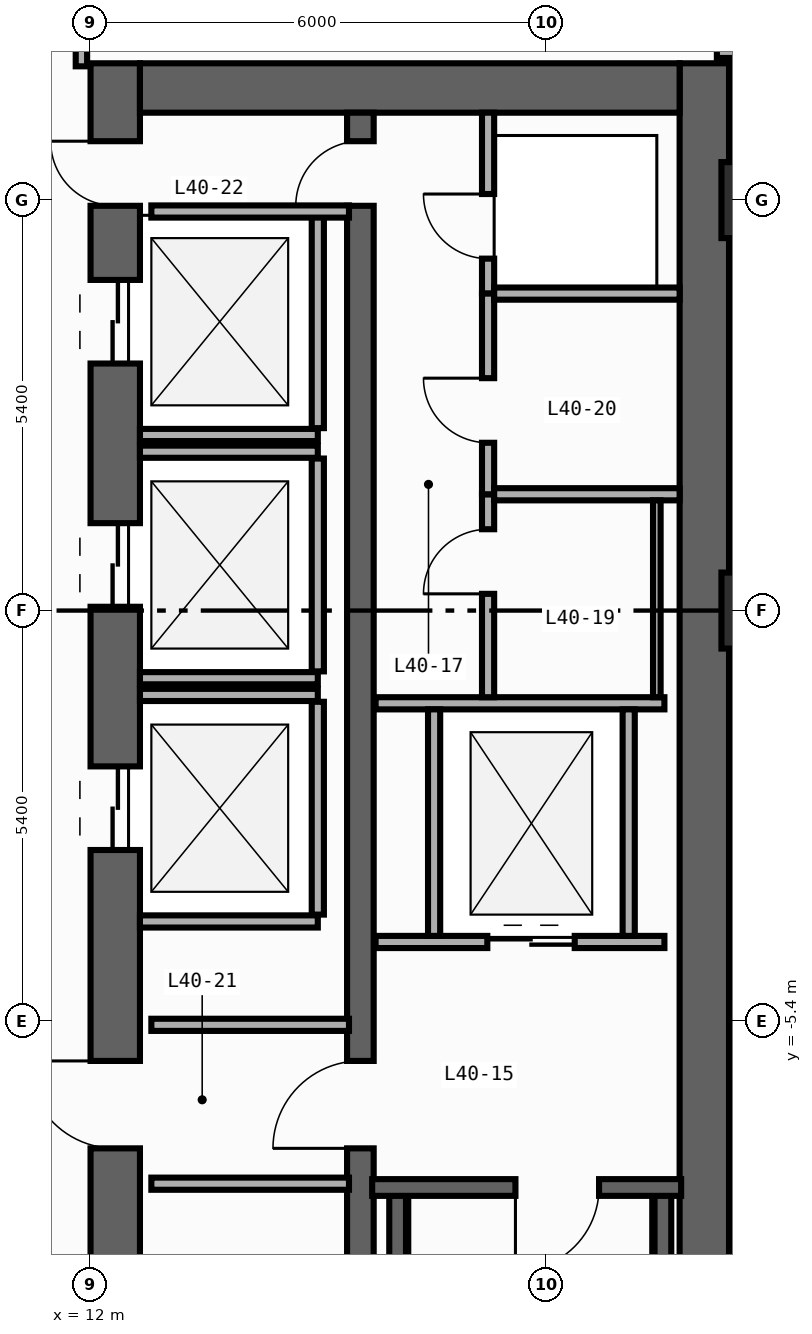
"""IFC4 building model, lengths in metres.
Left out: names, types, materials, properties, quantities, classifications, styles, units other than length and angle.
Written with IfcOpenShell. Run it as: python <this file> out.ifc"""

import sys

from ifc_helpers import new_model, si_unit, direction, frame, frame_2d, origin, origin_2d, place, context, subcontext, project, spatial, rectangle, extrude, element, fill, save


model = new_model("IFC4")
c1 = context("Model", 3, precision=1e-05, world=origin(), true_north=direction((0.0, 1.0)))
c2 = subcontext(c1, "Body", "Model", "MODEL_VIEW")
j1 = project(units=[si_unit("LENGTHUNIT", "METRE"), si_unit("PLANEANGLEUNIT", "RADIAN")], contexts=[c1])
p1 = place(None, origin())
s1 = spatial("IfcSite", under=j1, at=p1, CompositionType="ELEMENT")
p2 = place(p1, origin())
s2 = spatial("IfcBuilding", under=s1, at=p2, CompositionType="ELEMENT")
p3 = place(p2, frame((0.0, 0.0, 176.4)))
s3 = spatial("IfcBuildingStorey", under=s2, at=p3, CompositionType="ELEMENT", Elevation=176.4)
p4 = place(p3, frame((12.325, -19.8, 0.0), z_axis=(0.0, 0.0, 1.0), x_axis=(0.0, 1.0, 0.0)))
e1 = element("IfcWall", 1, at=p4, inside=s3, PredefinedType="SHEAR", context=c2, shape_type="SweptSolid", body=[
    extrude(rectangle(XDim=27.0, YDim=0.65, at=frame_2d((13.5, 0.0))), origin(), (0.0, 0.0, 1.0), 3.54),
])
p5 = place(p4, frame((23.05, 0.0, 0.0)))
e2 = element("IfcOpeningElement", 2, at=p5, cuts=e1, PredefinedType="OPENING", context=c2, shape_type="SweptSolid", body=[
    extrude(rectangle(XDim=1.1, YDim=2.2, at=frame_2d((0.55, 1.1))), frame((0.0, 0.335, 0.0), z_axis=(0.0, -1.0, 0.0), x_axis=(1.0, 0.0, 0.0)), (0.0, 0.0, 1.0), 0.67),
])
p6 = place(p4, frame((19.85, 0.0, 0.0)))
e3 = element("IfcOpeningElement", 3, at=p6, cuts=e1, PredefinedType="OPENING", context=c2, shape_type="SweptSolid", body=[
    extrude(rectangle(XDim=1.1, YDim=2.2, at=frame_2d((0.55, 1.1))), frame((0.0, 0.335, 0.0), z_axis=(0.0, -1.0, 0.0), x_axis=(1.0, 0.0, 0.0)), (0.0, 0.0, 1.0), 0.67),
])
p7 = place(p4, frame((16.65, 0.0, 0.0)))
e4 = element("IfcOpeningElement", 4, at=p7, cuts=e1, PredefinedType="OPENING", context=c2, shape_type="SweptSolid", body=[
    extrude(rectangle(XDim=1.1, YDim=2.2, at=frame_2d((0.55, 1.1))), frame((0.0, 0.335, 0.0), z_axis=(0.0, -1.0, 0.0), x_axis=(1.0, 0.0, 0.0)), (0.0, 0.0, 1.0), 0.67),
])
p8 = place(p4, frame((7.175, 0.0, 0.0)))
e5 = element("IfcOpeningElement", 5, at=p8, cuts=e1, PredefinedType="OPENING", context=c2, shape_type="SweptSolid", body=[
    extrude(rectangle(XDim=0.85, YDim=2.1, at=frame_2d((0.425, 1.05))), frame((0.0, 0.335, 0.0), z_axis=(0.0, -1.0, 0.0), x_axis=(1.0, 0.0, 0.0)), (0.0, 0.0, 1.0), 0.67),
])
p9 = place(p4, frame((10.375, 0.0, 0.0)))
e6 = element("IfcOpeningElement", 6, at=p9, cuts=e1, PredefinedType="OPENING", context=c2, shape_type="SweptSolid", body=[
    extrude(rectangle(XDim=0.85, YDim=2.1, at=frame_2d((0.425, 1.05))), frame((0.0, 0.335, 0.0), z_axis=(0.0, -1.0, 0.0), x_axis=(1.0, 0.0, 0.0)), (0.0, 0.0, 1.0), 0.67),
])
p10 = place(p4, frame((12.725, 0.0, 0.0)))
e7 = element("IfcOpeningElement", 7, at=p10, cuts=e1, PredefinedType="OPENING", context=c2, shape_type="SweptSolid", body=[
    extrude(rectangle(XDim=1.15, YDim=2.2, at=frame_2d((0.575, 1.1))), frame((0.0, 0.335, 0.0), z_axis=(0.0, -1.0, 0.0), x_axis=(1.0, 0.0, 0.0)), (0.0, 0.0, 1.0), 0.67),
])
p11 = place(p4, frame((25.125, 0.0, 0.0)))
e8 = element("IfcOpeningElement", 8, at=p11, cuts=e1, PredefinedType="OPENING", context=c2, shape_type="SweptSolid", body=[
    extrude(rectangle(XDim=0.85, YDim=2.1, at=frame_2d((0.425, 1.05))), frame((0.0, 0.335, 0.0), z_axis=(0.0, -1.0, 0.0), x_axis=(1.0, 0.0, 0.0)), (0.0, 0.0, 1.0), 0.67),
])
p12 = place(p3, frame((20.075, -19.8, 0.0), z_axis=(0.0, 0.0, 1.0), x_axis=(0.0, 1.0, 0.0)))
e9 = element("IfcWall", 9, at=p12, inside=s3, PredefinedType="SHEAR", context=c2, shape_type="SweptSolid", body=[
    extrude(rectangle(XDim=27.0, YDim=0.65, at=frame_2d((13.5, 0.0))), origin(), (0.0, 0.0, 1.0), 3.54),
])
p13 = place(p3, frame((12.65, 6.875, 0.0), z_axis=(0.0, 0.0, 1.0), x_axis=(1.0, 0.0, 0.0)))
e10 = element("IfcWall", 10, at=p13, inside=s3, PredefinedType="SHEAR", context=c2, shape_type="SweptSolid", body=[
    extrude(rectangle(XDim=7.1, YDim=0.65, at=frame_2d((3.55, 0.0))), origin(), (0.0, 0.0, 1.0), 3.54),
])
p14 = place(p3, frame((15.55, -19.15, 0.0), z_axis=(0.0, 0.0, 1.0), x_axis=(0.0, 1.0, 0.0)))
e11 = element("IfcWall", 11, at=p14, inside=s3, PredefinedType="SHEAR", context=c2, shape_type="SweptSolid", body=[
    extrude(rectangle(XDim=25.7, YDim=0.35, at=frame_2d((12.85, 0.0))), origin(), (0.0, 0.0, 1.0), 3.54),
])
p15 = place(p14, frame((12.075, 0.0, 0.0)))
e12 = element("IfcOpeningElement", 12, at=p15, cuts=e11, PredefinedType="OPENING", context=c2, shape_type="SweptSolid", body=[
    extrude(rectangle(XDim=1.15, YDim=2.2, at=frame_2d((0.575, 1.1))), frame((0.0, 0.185, 0.0), z_axis=(0.0, -1.0, 0.0), x_axis=(1.0, 0.0, 0.0)), (0.0, 0.0, 1.0), 0.37),
])
p16 = place(p14, frame((24.475, 0.0, 0.0)))
e13 = element("IfcOpeningElement", 13, at=p16, cuts=e11, PredefinedType="OPENING", context=c2, shape_type="SweptSolid", body=[
    extrude(rectangle(XDim=0.85, YDim=2.1, at=frame_2d((0.425, 1.05))), frame((0.0, 0.185, 0.0), z_axis=(0.0, -1.0, 0.0), x_axis=(1.0, 0.0, 0.0)), (0.0, 0.0, 1.0), 0.37),
])
for number, where, z_axis, x_axis in (
    (14, (16.04, -19.01, 0.0), (0.0, 0.0, 1.0), (0.0, 1.0, 0.0)),
    (15, (19.53, -19.01, 0.0), (0.0, 0.0, 1.0), (0.0, 1.0, 0.0)),
):
    element("IfcWall", number, at=place(p3, frame(where, z_axis=z_axis, x_axis=x_axis)), inside=s3, PredefinedType="SHEAR", context=c2, shape_type="SweptSolid", body=[
        extrude(rectangle(XDim=11.42, YDim=0.22, at=frame_2d((5.71, 0.0))), origin(), (0.0, 0.0, 1.0), 3.54),
    ])
p17 = place(p3, frame((19.77, -7.59, 0.0), z_axis=(0.0, 0.0, 1.0), x_axis=(-1.0, 0.0, 0.0)))
e16 = element("IfcWall", 16, at=p17, inside=s3, PredefinedType="SHEAR", context=c2, shape_type="SweptSolid", body=[
    extrude(rectangle(XDim=4.065, YDim=0.22, at=frame_2d((2.032, 0.0))), origin(), (0.0, 0.0, 1.0), 3.54),
])
p18 = place(p17, frame((1.08, 0.0, 0.0)))
e17 = element("IfcOpeningElement", 17, at=p18, cuts=e16, PredefinedType="OPENING", context=c2, shape_type="SweptSolid", body=[
    extrude(rectangle(XDim=1.1, YDim=2.2, at=frame_2d((0.55, 1.1))), frame((0.0, 0.12, 0.0), z_axis=(0.0, -1.0, 0.0), x_axis=(1.0, 0.0, 0.0)), (0.0, 0.0, 1.0), 0.24),
])
for number, where, z_axis, x_axis in (
    (18, (20.8, 0.0, 0.0), (0.0, 0.0, 1.0), (1.0, 0.0, 0.0)),
    (19, (20.8, 5.4, 0.0), (0.0, 0.0, 1.0), (1.0, 0.0, 0.0)),
):
    element("IfcColumn", number, at=place(p3, frame(where, z_axis=z_axis, x_axis=x_axis)), inside=s3, PredefinedType="COLUMN", context=c2, shape_type="SweptSolid", body=[
        extrude(rectangle(XDim=1.0, YDim=1.0, at=origin_2d()), origin(), (0.0, 0.0, 1.0), 3.8),
    ])
p19 = place(p3, frame((12.65, 2.31, 0.0), z_axis=(0.0, 0.0, 1.0), x_axis=(1.0, 0.0, 0.0)))
e20 = element("IfcWall", 20, at=p19, inside=s3, PredefinedType="STANDARD", context=c2, shape_type="SweptSolid", body=[
    extrude(rectangle(XDim=2.34, YDim=0.16, at=frame_2d((1.17, 0.0))), origin(), (0.0, 0.0, 1.0), 3.54),
])
p20 = place(p3, frame((14.99, 2.4, 0.0), z_axis=(0.0, 0.0, 1.0), x_axis=(0.0, 1.0, 0.0)))
e21 = element("IfcWall", 21, at=p20, inside=s3, PredefinedType="STANDARD", context=c2, shape_type="SweptSolid", body=[
    extrude(rectangle(XDim=2.8, YDim=0.16, at=frame_2d((1.4, 0.0))), origin(), (0.0, 0.0, 1.0), 3.54),
])
for number, where, z_axis, x_axis in (
    (22, (12.65, -0.89, 0.0), (0.0, 0.0, 1.0), (1.0, 0.0, 0.0)),
    (23, (12.65, 2.09, 0.0), (0.0, 0.0, 1.0), (1.0, 0.0, 0.0)),
):
    element("IfcWall", number, at=place(p3, frame(where, z_axis=z_axis, x_axis=x_axis)), inside=s3, PredefinedType="STANDARD", context=c2, shape_type="SweptSolid", body=[
        extrude(rectangle(XDim=2.34, YDim=0.16, at=frame_2d((1.17, 0.0))), origin(), (0.0, 0.0, 1.0), 3.54),
    ])
p21 = place(p3, frame((14.99, -0.8, 0.0), z_axis=(0.0, 0.0, 1.0), x_axis=(0.0, 1.0, 0.0)))
e24 = element("IfcWall", 24, at=p21, inside=s3, PredefinedType="STANDARD", context=c2, shape_type="SweptSolid", body=[
    extrude(rectangle(XDim=2.8, YDim=0.16, at=frame_2d((1.4, 0.0))), origin(), (0.0, 0.0, 1.0), 3.54),
])
for number, where, z_axis, x_axis in (
    (25, (12.65, -4.09, 0.0), (0.0, 0.0, 1.0), (1.0, 0.0, 0.0)),
    (26, (12.65, -1.11, 0.0), (0.0, 0.0, 1.0), (1.0, 0.0, 0.0)),
):
    element("IfcWall", number, at=place(p3, frame(where, z_axis=z_axis, x_axis=x_axis)), inside=s3, PredefinedType="STANDARD", context=c2, shape_type="SweptSolid", body=[
        extrude(rectangle(XDim=2.34, YDim=0.16, at=frame_2d((1.17, 0.0))), origin(), (0.0, 0.0, 1.0), 3.54),
    ])
p22 = place(p3, frame((14.99, -4.0, 0.0), z_axis=(0.0, 0.0, 1.0), x_axis=(0.0, 1.0, 0.0)))
e27 = element("IfcWall", 27, at=p22, inside=s3, PredefinedType="STANDARD", context=c2, shape_type="SweptSolid", body=[
    extrude(rectangle(XDim=2.8, YDim=0.16, at=frame_2d((1.4, 0.0))), origin(), (0.0, 0.0, 1.0), 3.54),
])
p23 = place(p3, frame((15.75, -4.36, 0.0), z_axis=(0.0, 0.0, 1.0), x_axis=(1.0, 0.0, 0.0)))
e28 = element("IfcWall", 28, at=p23, inside=s3, PredefinedType="STANDARD", context=c2, shape_type="SweptSolid", body=[
    extrude(rectangle(XDim=3.8, YDim=0.16, at=frame_2d((1.9, 0.0))), origin(), (0.0, 0.0, 1.0), 3.54),
])
p24 = place(p23, frame((1.47, 0.0, 0.0)))
e29 = element("IfcOpeningElement", 29, at=p24, cuts=e28, PredefinedType="OPENING", context=c2, shape_type="SweptSolid", body=[
    extrude(rectangle(XDim=1.15, YDim=2.2, at=frame_2d((0.575, 1.1))), frame((0.0, 0.09, 0.0), z_axis=(0.0, -1.0, 0.0), x_axis=(1.0, 0.0, 0.0)), (0.0, 0.0, 1.0), 0.18),
])
p25 = place(p3, frame((15.75, -1.22, 0.0), z_axis=(0.0, 0.0, 1.0), x_axis=(1.0, 0.0, 0.0)))
e30 = element("IfcWall", 30, at=p25, inside=s3, PredefinedType="STANDARD", context=c2, shape_type="SweptSolid", body=[
    extrude(rectangle(XDim=3.8, YDim=0.16, at=frame_2d((1.9, 0.0))), origin(), (0.0, 0.0, 1.0), 3.54),
])
for number, where, z_axis, x_axis in (
    (31, (16.52, -4.28, 0.0), (0.0, 0.0, 1.0), (0.0, 1.0, 0.0)),
    (32, (19.08, -4.28, 0.0), (0.0, 0.0, 1.0), (0.0, 1.0, 0.0)),
):
    element("IfcWall", number, at=place(p3, frame(where, z_axis=z_axis, x_axis=x_axis)), inside=s3, PredefinedType="STANDARD", context=c2, shape_type="SweptSolid", body=[
        extrude(rectangle(XDim=2.98, YDim=0.16, at=frame_2d((1.49, 0.0))), origin(), (0.0, 0.0, 1.0), 3.54),
    ])
for number, where, z_axis, x_axis in (
    (33, (12.8, -5.45, 0.0), (0.0, 0.0, 1.0), (1.0, 0.0, 0.0)),
    (34, (12.8, -7.54, 0.0), (0.0, 0.0, 1.0), (1.0, 0.0, 0.0)),
    (35, (12.8, 5.25, 0.0), (0.0, 0.0, 1.0), (1.0, 0.0, 0.0)),
):
    element("IfcWall", number, at=place(p3, frame(where, z_axis=z_axis, x_axis=x_axis)), inside=s3, PredefinedType="STANDARD", context=c2, shape_type="SweptSolid", body=[
        extrude(rectangle(XDim=2.6, YDim=0.16, at=frame_2d((1.3, 0.0))), origin(), (0.0, 0.0, 1.0), 3.54),
    ])
p26 = place(p3, frame((17.23, 4.17, 0.0), z_axis=(0.0, 0.0, 1.0), x_axis=(0.0, 1.0, 0.0)))
e36 = element("IfcWall", 36, at=p26, inside=s3, PredefinedType="PARTITIONING", context=c2, shape_type="SweptSolid", body=[
    extrude(rectangle(XDim=2.38, YDim=0.16, at=frame_2d((1.19, 0.0))), origin(), (0.0, 0.0, 1.0), 3.54),
])
p27 = place(p26, frame((0.46, 0.0, 0.0)))
e37 = element("IfcOpeningElement", 37, at=p27, cuts=e36, PredefinedType="OPENING", context=c2, shape_type="SweptSolid", body=[
    extrude(rectangle(XDim=0.85, YDim=2.1, at=frame_2d((0.425, 1.05))), frame((0.0, 0.09, 0.0), z_axis=(0.0, -1.0, 0.0), x_axis=(1.0, 0.0, 0.0)), (0.0, 0.0, 1.0), 0.18),
])
p28 = place(p3, frame((17.23, -1.14, 0.0), z_axis=(0.0, 0.0, 1.0), x_axis=(0.0, 1.0, 0.0)))
e38 = element("IfcWall", 38, at=p28, inside=s3, PredefinedType="PARTITIONING", context=c2, shape_type="SweptSolid", body=[
    extrude(rectangle(XDim=2.67, YDim=0.16, at=frame_2d((1.335, 0.0))), origin(), (0.0, 0.0, 1.0), 3.54),
])
p29 = place(p28, frame((1.36, 0.0, 0.0)))
e39 = element("IfcOpeningElement", 39, at=p29, cuts=e38, PredefinedType="OPENING", context=c2, shape_type="SweptSolid", body=[
    extrude(rectangle(XDim=0.85, YDim=2.1, at=frame_2d((0.425, 1.05))), frame((0.0, 0.09, 0.0), z_axis=(0.0, -1.0, 0.0), x_axis=(1.0, 0.0, 0.0)), (0.0, 0.0, 1.0), 0.18),
])
p30 = place(p3, frame((17.23, 1.53, 0.0), z_axis=(0.0, 0.0, 1.0), x_axis=(0.0, 1.0, 0.0)))
e40 = element("IfcWall", 40, at=p30, inside=s3, PredefinedType="PARTITIONING", context=c2, shape_type="SweptSolid", body=[
    extrude(rectangle(XDim=2.64, YDim=0.16, at=frame_2d((1.32, 0.0))), origin(), (0.0, 0.0, 1.0), 3.54),
])
p31 = place(p30, frame((0.677, 0.0, 0.0)))
e41 = element("IfcOpeningElement", 41, at=p31, cuts=e40, PredefinedType="OPENING", context=c2, shape_type="SweptSolid", body=[
    extrude(rectangle(XDim=0.85, YDim=2.1, at=frame_2d((0.425, 1.05))), frame((0.0, 0.09, 0.0), z_axis=(0.0, -1.0, 0.0), x_axis=(1.0, 0.0, 0.0)), (0.0, 0.0, 1.0), 0.18),
])
for number, where, z_axis, x_axis in (
    (42, (17.31, 4.17, 0.0), (0.0, 0.0, 1.0), (1.0, 0.0, 0.0)),
    (43, (17.31, 1.53, 0.0), (0.0, 0.0, 1.0), (1.0, 0.0, 0.0)),
):
    element("IfcWall", number, at=place(p3, frame(where, z_axis=z_axis, x_axis=x_axis)), inside=s3, PredefinedType="PARTITIONING", context=c2, shape_type="SweptSolid", body=[
        extrude(rectangle(XDim=2.44, YDim=0.16, at=frame_2d((1.22, 0.0))), origin(), (0.0, 0.0, 1.0), 3.54),
    ])
p32 = place(p3, frame((11.88, 7.16, 0.0), z_axis=(0.0, 0.0, 1.0), x_axis=(0.0, 1.0, 0.0)))
e44 = element("IfcWall", 44, at=p32, inside=s3, PredefinedType="PARTITIONING", context=c2, shape_type="SweptSolid", body=[
    extrude(rectangle(XDim=8.755, YDim=0.15, at=frame_2d((4.377, 0.0))), origin(), (0.0, 0.0, 1.0), 3.54),
])
p33 = place(p32, frame((0.46, 0.0, 0.0)))
e45 = element("IfcOpeningElement", 45, at=p33, cuts=e44, PredefinedType="OPENING", context=c2, shape_type="SweptSolid", body=[
    extrude(rectangle(XDim=0.9, YDim=2.15, at=frame_2d((0.45, 1.075))), frame((0.0, 0.085, 0.0), z_axis=(0.0, -1.0, 0.0), x_axis=(1.0, 0.0, 0.0)), (0.0, 0.0, 1.0), 0.17),
])
p34 = place(p3, frame((20.24, 7.34, 0.0), z_axis=(0.0, 0.0, 1.0), x_axis=(1.0, 0.0, 0.0)))
e46 = element("IfcWall", 46, at=p34, inside=s3, PredefinedType="PARTITIONING", context=c2, shape_type="SweptSolid", body=[
    extrude(rectangle(XDim=2.215, YDim=0.14, at=frame_2d((1.107, 0.0))), origin(), (0.0, 0.0, 1.0), 3.54),
])
p35 = place(p34, frame((0.905, 0.0, 0.0)))
e47 = element("IfcOpeningElement", 47, at=p35, cuts=e46, PredefinedType="OPENING", context=c2, shape_type="SweptSolid", body=[
    extrude(rectangle(XDim=0.85, YDim=2.1, at=frame_2d((0.425, 1.05))), frame((0.0, 0.08, 0.0), z_axis=(0.0, -1.0, 0.0), x_axis=(1.0, 0.0, 0.0)), (0.0, 0.0, 1.0), 0.16),
])
p36 = place(p3, frame((19.45, 1.45, 0.0), z_axis=(0.0, 0.0, 1.0), x_axis=(0.0, -1.0, 0.0)))
e48 = element("IfcWall", 48, at=p36, inside=s3, PredefinedType="PARTITIONING", context=c2, shape_type="SweptSolid", body=[
    extrude(rectangle(XDim=2.59, YDim=0.1, at=frame_2d((1.295, 0.0))), origin(), (0.0, 0.0, 1.0), 3.54),
])
p37 = place(p18, origin())
e49 = element("IfcDoor", 49, at=p37, inside=s3, OperationType="SINGLE_SWING_RIGHT", PredefinedType="DOOR", context=c2, shape_type="SweptSolid", body=[
    extrude(rectangle(XDim=1.1, YDim=2.2, at=frame_2d((0.55, 1.1))), frame((0.0, 0.025, 0.0), z_axis=(0.0, -1.0, 0.0), x_axis=(1.0, 0.0, 0.0)), (0.0, 0.0, 1.0), 0.05),
])
fill(e17, e49)
p38 = place(p5, origin())
e50 = element("IfcDoor", 50, at=p38, inside=s3, OperationType="DOUBLE_DOOR_SLIDING", PredefinedType="DOOR", context=c2, shape_type="SweptSolid", body=[
    extrude(rectangle(XDim=1.1, YDim=2.2, at=frame_2d((0.55, 1.1))), frame((0.0, 0.025, 0.0), z_axis=(0.0, -1.0, 0.0), x_axis=(1.0, 0.0, 0.0)), (0.0, 0.0, 1.0), 0.05),
])
fill(e2, e50)
p39 = place(p6, origin())
e51 = element("IfcDoor", 51, at=p39, inside=s3, OperationType="DOUBLE_DOOR_SLIDING", PredefinedType="DOOR", context=c2, shape_type="SweptSolid", body=[
    extrude(rectangle(XDim=1.1, YDim=2.2, at=frame_2d((0.55, 1.1))), frame((0.0, 0.025, 0.0), z_axis=(0.0, -1.0, 0.0), x_axis=(1.0, 0.0, 0.0)), (0.0, 0.0, 1.0), 0.05),
])
fill(e3, e51)
p40 = place(p7, origin())
e52 = element("IfcDoor", 52, at=p40, inside=s3, OperationType="DOUBLE_DOOR_SLIDING", PredefinedType="DOOR", context=c2, shape_type="SweptSolid", body=[
    extrude(rectangle(XDim=1.1, YDim=2.2, at=frame_2d((0.55, 1.1))), frame((0.0, 0.025, 0.0), z_axis=(0.0, -1.0, 0.0), x_axis=(1.0, 0.0, 0.0)), (0.0, 0.0, 1.0), 0.05),
])
fill(e4, e52)
p41 = place(p10, origin())
e53 = element("IfcDoor", 53, at=p41, inside=s3, OperationType="SINGLE_SWING_RIGHT", PredefinedType="DOOR", context=c2, shape_type="SweptSolid", body=[
    extrude(rectangle(XDim=1.15, YDim=2.2, at=frame_2d((0.575, 1.1))), frame((0.0, 0.025, 0.0), z_axis=(0.0, -1.0, 0.0), x_axis=(1.0, 0.0, 0.0)), (0.0, 0.0, 1.0), 0.05),
])
fill(e7, e53)
p42 = place(p15, origin())
e54 = element("IfcDoor", 54, at=p42, inside=s3, OperationType="SINGLE_SWING_LEFT", PredefinedType="DOOR", context=c2, shape_type="SweptSolid", body=[
    extrude(rectangle(XDim=1.15, YDim=2.2, at=frame_2d((0.575, 1.1))), frame((0.0, 0.025, 0.0), z_axis=(0.0, -1.0, 0.0), x_axis=(1.0, 0.0, 0.0)), (0.0, 0.0, 1.0), 0.05),
])
fill(e12, e54)
p43 = place(p11, origin())
e55 = element("IfcDoor", 55, at=p43, inside=s3, OperationType="SINGLE_SWING_RIGHT", PredefinedType="DOOR", context=c2, shape_type="SweptSolid", body=[
    extrude(rectangle(XDim=0.85, YDim=2.1, at=frame_2d((0.425, 1.05))), frame((0.0, 0.025, 0.0), z_axis=(0.0, -1.0, 0.0), x_axis=(1.0, 0.0, 0.0)), (0.0, 0.0, 1.0), 0.05),
])
fill(e8, e55)
p44 = place(p16, origin())
e56 = element("IfcDoor", 56, at=p44, inside=s3, OperationType="SINGLE_SWING_LEFT", PredefinedType="DOOR", context=c2, shape_type="SweptSolid", body=[
    extrude(rectangle(XDim=0.85, YDim=2.1, at=frame_2d((0.425, 1.05))), frame((0.0, 0.025, 0.0), z_axis=(0.0, -1.0, 0.0), x_axis=(1.0, 0.0, 0.0)), (0.0, 0.0, 1.0), 0.05),
])
fill(e13, e56)
p45 = place(p24, origin())
e57 = element("IfcDoor", 57, at=p45, inside=s3, OperationType="DOUBLE_DOOR_SLIDING", PredefinedType="DOOR", context=c2, shape_type="SweptSolid", body=[
    extrude(rectangle(XDim=1.15, YDim=2.2, at=frame_2d((0.575, 1.1))), frame((0.0, 0.025, 0.0), z_axis=(0.0, -1.0, 0.0), x_axis=(1.0, 0.0, 0.0)), (0.0, 0.0, 1.0), 0.05),
])
fill(e29, e57)
p46 = place(p27, origin())
e58 = element("IfcDoor", 58, at=p46, inside=s3, OperationType="SINGLE_SWING_RIGHT", PredefinedType="DOOR", context=c2, shape_type="SweptSolid", body=[
    extrude(rectangle(XDim=0.85, YDim=2.1, at=frame_2d((0.425, 1.05))), frame((0.0, 0.025, 0.0), z_axis=(0.0, -1.0, 0.0), x_axis=(1.0, 0.0, 0.0)), (0.0, 0.0, 1.0), 0.05),
])
fill(e37, e58)
p47 = place(p29, origin())
e59 = element("IfcDoor", 59, at=p47, inside=s3, OperationType="SINGLE_SWING_LEFT", PredefinedType="DOOR", context=c2, shape_type="SweptSolid", body=[
    extrude(rectangle(XDim=0.85, YDim=2.1, at=frame_2d((0.425, 1.05))), frame((0.0, 0.025, 0.0), z_axis=(0.0, -1.0, 0.0), x_axis=(1.0, 0.0, 0.0)), (0.0, 0.0, 1.0), 0.05),
])
fill(e39, e59)
p48 = place(p31, origin())
e60 = element("IfcDoor", 60, at=p48, inside=s3, OperationType="SINGLE_SWING_RIGHT", PredefinedType="DOOR", context=c2, shape_type="SweptSolid", body=[
    extrude(rectangle(XDim=0.85, YDim=2.1, at=frame_2d((0.425, 1.05))), frame((0.0, 0.025, 0.0), z_axis=(0.0, -1.0, 0.0), x_axis=(1.0, 0.0, 0.0)), (0.0, 0.0, 1.0), 0.05),
])
fill(e41, e60)
save(model, sys.argv[1])
